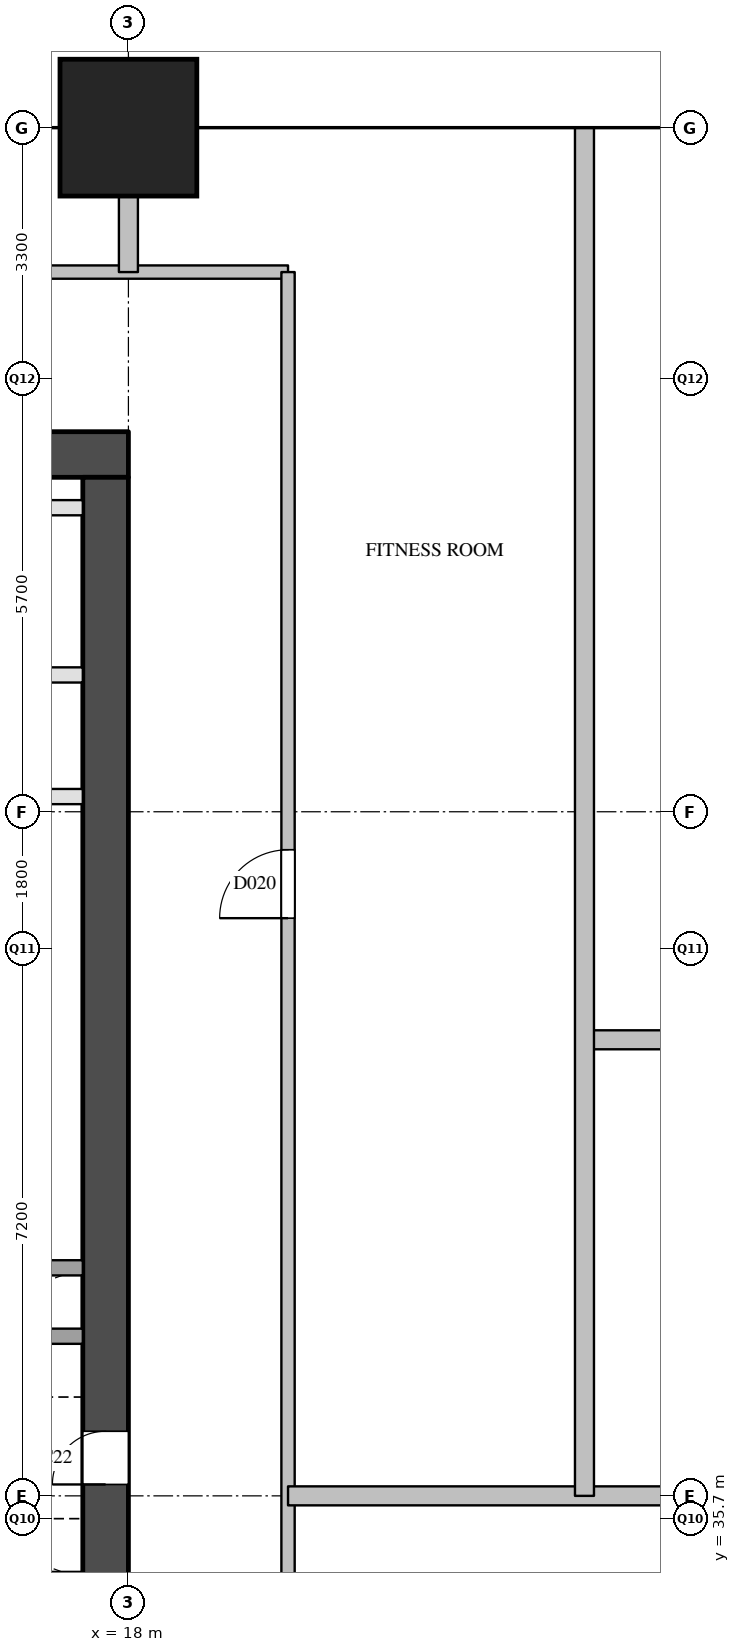
"""IFC4 building model, lengths in metres.
Left out: names, types, materials, properties, quantities, classifications, styles, units other than length and angle.
Written with IfcOpenShell. Run it as: python <this file> out.ifc"""

import sys

from ifc_helpers import new_model, si_unit, direction, frame, frame_2d, origin, origin_2d, place, context, subcontext, project, spatial, rectangle, extrude, element, fill, save


model = new_model("IFC4")
c1 = context("Model", 3, precision=1e-05, world=origin(), true_north=direction((0.0, 1.0)))
c2 = subcontext(c1, "Body", "Model", "MODEL_VIEW")
j1 = project(units=[si_unit("LENGTHUNIT", "METRE"), si_unit("PLANEANGLEUNIT", "RADIAN")], contexts=[c1])
p1 = place(None, origin())
s1 = spatial("IfcSite", under=j1, at=p1, CompositionType="ELEMENT")
p2 = place(p1, origin())
s2 = spatial("IfcBuilding", under=s1, at=p2, CompositionType="ELEMENT")
p3 = place(p2, frame((0.0, 0.0, 93.0)))
s3 = spatial("IfcBuildingStorey", under=s2, at=p3, CompositionType="ELEMENT", Elevation=93.0)
p4 = place(p3, frame((18.0, 54.0, 0.0), z_axis=(0.0, 0.0, 1.0), x_axis=(1.0, 0.0, 0.0)))
e1 = element("IfcColumn", 1, at=p4, inside=s3, PredefinedType="COLUMN", context=c2, shape_type="SweptSolid", body=[
    extrude(rectangle(XDim=1.8, YDim=1.8, at=origin_2d()), origin(), (0.0, 0.0, 1.0), 3.8),
])
p5 = place(p3, frame((5.6, 49.7, 0.0), z_axis=(0.0, 0.0, 1.0), x_axis=(1.0, 0.0, 0.0)))
e2 = element("IfcWall", 2, at=p5, inside=s3, PredefinedType="SHEAR", context=c2, shape_type="SweptSolid", body=[
    extrude(rectangle(XDim=12.4, YDim=0.6, at=frame_2d((6.2, 0.0))), origin(), (0.0, 0.0, 1.0), 3.5),
])
p6 = place(p3, frame((17.7, 29.1, 0.0), z_axis=(0.0, 0.0, 1.0), x_axis=(0.0, 1.0, 0.0)))
e3 = element("IfcWall", 3, at=p6, inside=s3, PredefinedType="SHEAR", context=c2, shape_type="SweptSolid", body=[
    extrude(rectangle(XDim=20.3, YDim=0.6, at=frame_2d((10.15, 0.0))), origin(), (0.0, 0.0, 1.0), 3.5),
])
p7 = place(p6, frame((1.25, 0.0, 0.0)))
e4 = element("IfcOpeningElement", 4, at=p7, cuts=e3, PredefinedType="OPENING", context=c2, shape_type="SweptSolid", body=[
    extrude(rectangle(XDim=0.7, YDim=2.1, at=frame_2d((0.35, 1.05))), frame((0.0, 0.31, 0.0), z_axis=(0.0, -1.0, 0.0), x_axis=(1.0, 0.0, 0.0)), (0.0, 0.0, 1.0), 0.62),
])
p8 = place(p6, frame((7.05, 0.0, 0.0)))
e5 = element("IfcOpeningElement", 5, at=p8, cuts=e3, PredefinedType="OPENING", context=c2, shape_type="SweptSolid", body=[
    extrude(rectangle(XDim=0.7, YDim=2.1, at=frame_2d((0.35, 1.05))), frame((0.0, 0.31, 0.0), z_axis=(0.0, -1.0, 0.0), x_axis=(1.0, 0.0, 0.0)), (0.0, 0.0, 1.0), 0.62),
])
p9 = place(p3, frame((6.2, 38.1, 0.0), z_axis=(0.0, 0.0, 1.0), x_axis=(1.0, 0.0, 0.0)))
e6 = element("IfcWall", 6, at=p9, inside=s3, PredefinedType="SOLIDWALL", context=c2, shape_type="SweptSolid", body=[
    extrude(rectangle(XDim=11.2, YDim=0.2, at=frame_2d((5.6, 0.0))), origin(), (0.0, 0.0, 1.0), 3.5),
])
p10 = place(p9, frame((0.45, 0.0, 0.0)))
e7 = element("IfcOpeningElement", 7, at=p10, cuts=e6, PredefinedType="OPENING", context=c2, shape_type="SweptSolid", body=[
    extrude(rectangle(XDim=1.2, YDim=2.1, at=frame_2d((0.6, 1.05))), frame((0.0, 0.11, 0.0), z_axis=(0.0, -1.0, 0.0), x_axis=(1.0, 0.0, 0.0)), (0.0, 0.0, 1.0), 0.22),
])
p11 = place(p9, frame((2.55, 0.0, 0.0)))
e8 = element("IfcOpeningElement", 8, at=p11, cuts=e6, PredefinedType="OPENING", context=c2, shape_type="SweptSolid", body=[
    extrude(rectangle(XDim=1.2, YDim=2.1, at=frame_2d((0.6, 1.05))), frame((0.0, 0.11, 0.0), z_axis=(0.0, -1.0, 0.0), x_axis=(1.0, 0.0, 0.0)), (0.0, 0.0, 1.0), 0.22),
])
p12 = place(p9, frame((4.65, 0.0, 0.0)))
e9 = element("IfcOpeningElement", 9, at=p12, cuts=e6, PredefinedType="OPENING", context=c2, shape_type="SweptSolid", body=[
    extrude(rectangle(XDim=1.2, YDim=2.1, at=frame_2d((0.6, 1.05))), frame((0.0, 0.11, 0.0), z_axis=(0.0, -1.0, 0.0), x_axis=(1.0, 0.0, 0.0)), (0.0, 0.0, 1.0), 0.22),
])
p13 = place(p9, frame((6.75, 0.0, 0.0)))
e10 = element("IfcOpeningElement", 10, at=p13, cuts=e6, PredefinedType="OPENING", context=c2, shape_type="SweptSolid", body=[
    extrude(rectangle(XDim=1.2, YDim=2.1, at=frame_2d((0.6, 1.05))), frame((0.0, 0.11, 0.0), z_axis=(0.0, -1.0, 0.0), x_axis=(1.0, 0.0, 0.0)), (0.0, 0.0, 1.0), 0.22),
])
p14 = place(p3, frame((12.5, 39.0, 0.0), z_axis=(0.0, 0.0, 1.0), x_axis=(1.0, 0.0, 0.0)))
e11 = element("IfcWall", 11, at=p14, inside=s3, PredefinedType="SOLIDWALL", context=c2, shape_type="SweptSolid", body=[
    extrude(rectangle(XDim=4.9, YDim=0.2, at=frame_2d((2.45, 0.0))), origin(), (0.0, 0.0, 1.0), 3.5),
])
p15 = place(p3, frame((12.5, 45.2, 0.0), z_axis=(0.0, 0.0, 1.0), x_axis=(1.0, 0.0, 0.0)))
e12 = element("IfcWall", 12, at=p15, inside=s3, PredefinedType="PARTITIONING", context=c2, shape_type="SweptSolid", body=[
    extrude(rectangle(XDim=4.9, YDim=0.2, at=frame_2d((2.45, 0.0))), origin(), (0.0, 0.0, 1.0), 3.5),
])
p16 = place(p15, frame((0.653, 0.0, 0.0)))
e13 = element("IfcOpeningElement", 13, at=p16, cuts=e12, PredefinedType="OPENING", context=c2, shape_type="SweptSolid", body=[
    extrude(rectangle(XDim=0.9, YDim=2.1, at=frame_2d((0.45, 1.05))), frame((0.0, 0.11, 0.0), z_axis=(0.0, -1.0, 0.0), x_axis=(1.0, 0.0, 0.0)), (0.0, 0.0, 1.0), 0.22),
])
p17 = place(p15, frame((3.103, 0.0, 0.0)))
e14 = element("IfcOpeningElement", 14, at=p17, cuts=e12, PredefinedType="OPENING", context=c2, shape_type="SweptSolid", body=[
    extrude(rectangle(XDim=0.9, YDim=2.1, at=frame_2d((0.45, 1.05))), frame((0.0, 0.11, 0.0), z_axis=(0.0, -1.0, 0.0), x_axis=(1.0, 0.0, 0.0)), (0.0, 0.0, 1.0), 0.22),
])
p18 = place(p3, frame((6.2, 46.8, 0.0), z_axis=(0.0, 0.0, 1.0), x_axis=(1.0, 0.0, 0.0)))
e15 = element("IfcWall", 15, at=p18, inside=s3, PredefinedType="PARTITIONING", context=c2, shape_type="SweptSolid", body=[
    extrude(rectangle(XDim=11.2, YDim=0.2, at=frame_2d((5.6, 0.0))), origin(), (0.0, 0.0, 1.0), 3.5),
])
p19 = place(p18, frame((0.67, 0.0, 0.0)))
e16 = element("IfcOpeningElement", 16, at=p19, cuts=e15, PredefinedType="OPENING", context=c2, shape_type="SweptSolid", body=[
    extrude(rectangle(XDim=0.9, YDim=2.1, at=frame_2d((0.45, 1.05))), frame((0.0, 0.11, 0.0), z_axis=(0.0, -1.0, 0.0), x_axis=(1.0, 0.0, 0.0)), (0.0, 0.0, 1.0), 0.22),
])
p20 = place(p18, frame((6.27, 0.0, 0.0)))
e17 = element("IfcOpeningElement", 17, at=p20, cuts=e15, PredefinedType="OPENING", context=c2, shape_type="SweptSolid", body=[
    extrude(rectangle(XDim=0.9, YDim=2.1, at=frame_2d((0.45, 1.05))), frame((0.0, 0.11, 0.0), z_axis=(0.0, -1.0, 0.0), x_axis=(1.0, 0.0, 0.0)), (0.0, 0.0, 1.0), 0.22),
])
p21 = place(p3, frame((6.2, 49.0, 0.0), z_axis=(0.0, 0.0, 1.0), x_axis=(1.0, 0.0, 0.0)))
e18 = element("IfcWall", 18, at=p21, inside=s3, PredefinedType="PARTITIONING", context=c2, shape_type="SweptSolid", body=[
    extrude(rectangle(XDim=11.2, YDim=0.2, at=frame_2d((5.6, 0.0))), origin(), (0.0, 0.0, 1.0), 3.5),
])
p22 = place(p3, frame((3.5, 52.1, 0.0), z_axis=(0.0, 0.0, 1.0), x_axis=(1.0, 0.0, 0.0)))
e19 = element("IfcWall", 19, at=p22, inside=s3, PredefinedType="PARTITIONING", context=c2, shape_type="SweptSolid", body=[
    extrude(rectangle(XDim=16.6, YDim=0.175, at=frame_2d((8.3, 0.0))), origin(), (0.0, 0.0, 1.0), 3.5),
])
p23 = place(p22, frame((7.389, 0.0, 0.0)))
e20 = element("IfcOpeningElement", 20, at=p23, cuts=e19, PredefinedType="OPENING", context=c2, shape_type="SweptSolid", body=[
    extrude(rectangle(XDim=0.9, YDim=2.1, at=frame_2d((0.45, 1.05))), frame((0.0, 0.097, 0.0), z_axis=(0.0, -1.0, 0.0), x_axis=(1.0, 0.0, 0.0)), (0.0, 0.0, 1.0), 0.195),
])
p24 = place(p3, frame((20.1, 28.5, 0.0), z_axis=(0.0, 0.0, 1.0), x_axis=(0.0, 1.0, 0.0)))
e21 = element("IfcWall", 21, at=p24, inside=s3, PredefinedType="PARTITIONING", context=c2, shape_type="SweptSolid", body=[
    extrude(rectangle(XDim=23.6, YDim=0.175, at=frame_2d((11.8, 0.0))), origin(), (0.0, 0.0, 1.0), 3.5),
])
p25 = place(p24, frame((3.3, 0.0, 0.0)))
e22 = element("IfcOpeningElement", 22, at=p25, cuts=e21, PredefinedType="OPENING", context=c2, shape_type="SweptSolid", body=[
    extrude(rectangle(XDim=0.9, YDim=2.1, at=frame_2d((0.45, 1.05))), frame((0.0, 0.097, 0.0), z_axis=(0.0, -1.0, 0.0), x_axis=(1.0, 0.0, 0.0)), (0.0, 0.0, 1.0), 0.195),
])
p26 = place(p24, frame((15.1, 0.0, 0.0)))
e23 = element("IfcOpeningElement", 23, at=p26, cuts=e21, PredefinedType="OPENING", context=c2, shape_type="SweptSolid", body=[
    extrude(rectangle(XDim=0.9, YDim=2.1, at=frame_2d((0.45, 1.05))), frame((0.0, 0.097, 0.0), z_axis=(0.0, -1.0, 0.0), x_axis=(1.0, 0.0, 0.0)), (0.0, 0.0, 1.0), 0.195),
])
p27 = place(p3, frame((20.1, 36.0, 0.0), z_axis=(0.0, 0.0, 1.0), x_axis=(1.0, 0.0, 0.0)))
e24 = element("IfcWall", 24, at=p27, inside=s3, PredefinedType="PARTITIONING", context=c2, shape_type="SweptSolid", body=[
    extrude(rectangle(XDim=13.8, YDim=0.25, at=frame_2d((6.9, 0.0))), origin(), (0.0, 0.0, 1.0), 3.5),
])
p28 = place(p3, frame((24.0, 42.0, 0.0), z_axis=(0.0, 0.0, 1.0), x_axis=(1.0, 0.0, 0.0)))
e25 = element("IfcWall", 25, at=p28, inside=s3, PredefinedType="PARTITIONING", context=c2, shape_type="SweptSolid", body=[
    extrude(rectangle(XDim=9.9, YDim=0.25, at=frame_2d((4.95, 0.0))), origin(), (0.0, 0.0, 1.0), 2.5),
])
p29 = place(p3, frame((18.0, 52.1, 0.0), z_axis=(0.0, 0.0, 1.0), x_axis=(0.0, 1.0, 0.0)))
e26 = element("IfcWall", 26, at=p29, inside=s3, PredefinedType="PARTITIONING", context=c2, shape_type="SweptSolid", body=[
    extrude(rectangle(XDim=1.9, YDim=0.25, at=frame_2d((0.95, 0.0))), origin(), (0.0, 0.0, 1.0), 3.5),
])
p30 = place(p3, frame((24.0, 36.0, 0.0), z_axis=(0.0, 0.0, 1.0), x_axis=(0.0, 1.0, 0.0)))
e27 = element("IfcWall", 27, at=p30, inside=s3, PredefinedType="PARTITIONING", context=c2, shape_type="SweptSolid", body=[
    extrude(rectangle(XDim=18.0, YDim=0.25, at=frame_2d((9.0, 0.0))), origin(), (0.0, 0.0, 1.0), 2.5),
])
p31 = place(p8, origin())
e28 = element("IfcDoor", 28, at=p31, inside=s3, OperationType="SINGLE_SWING_LEFT", PredefinedType="DOOR", context=c2, shape_type="SweptSolid", body=[
    extrude(rectangle(XDim=0.7, YDim=2.1, at=frame_2d((0.35, 1.05))), frame((0.0, 0.025, 0.0), z_axis=(0.0, -1.0, 0.0), x_axis=(1.0, 0.0, 0.0)), (0.0, 0.0, 1.0), 0.05),
])
fill(e5, e28)
p32 = place(p26, origin())
e29 = element("IfcDoor", 29, at=p32, inside=s3, OperationType="SINGLE_SWING_LEFT", PredefinedType="DOOR", context=c2, shape_type="SweptSolid", body=[
    extrude(rectangle(XDim=0.9, YDim=2.1, at=frame_2d((0.45, 1.05))), frame((0.0, 0.025, 0.0), z_axis=(0.0, -1.0, 0.0), x_axis=(1.0, 0.0, 0.0)), (0.0, 0.0, 1.0), 0.05),
])
fill(e23, e29)
save(model, sys.argv[1])
